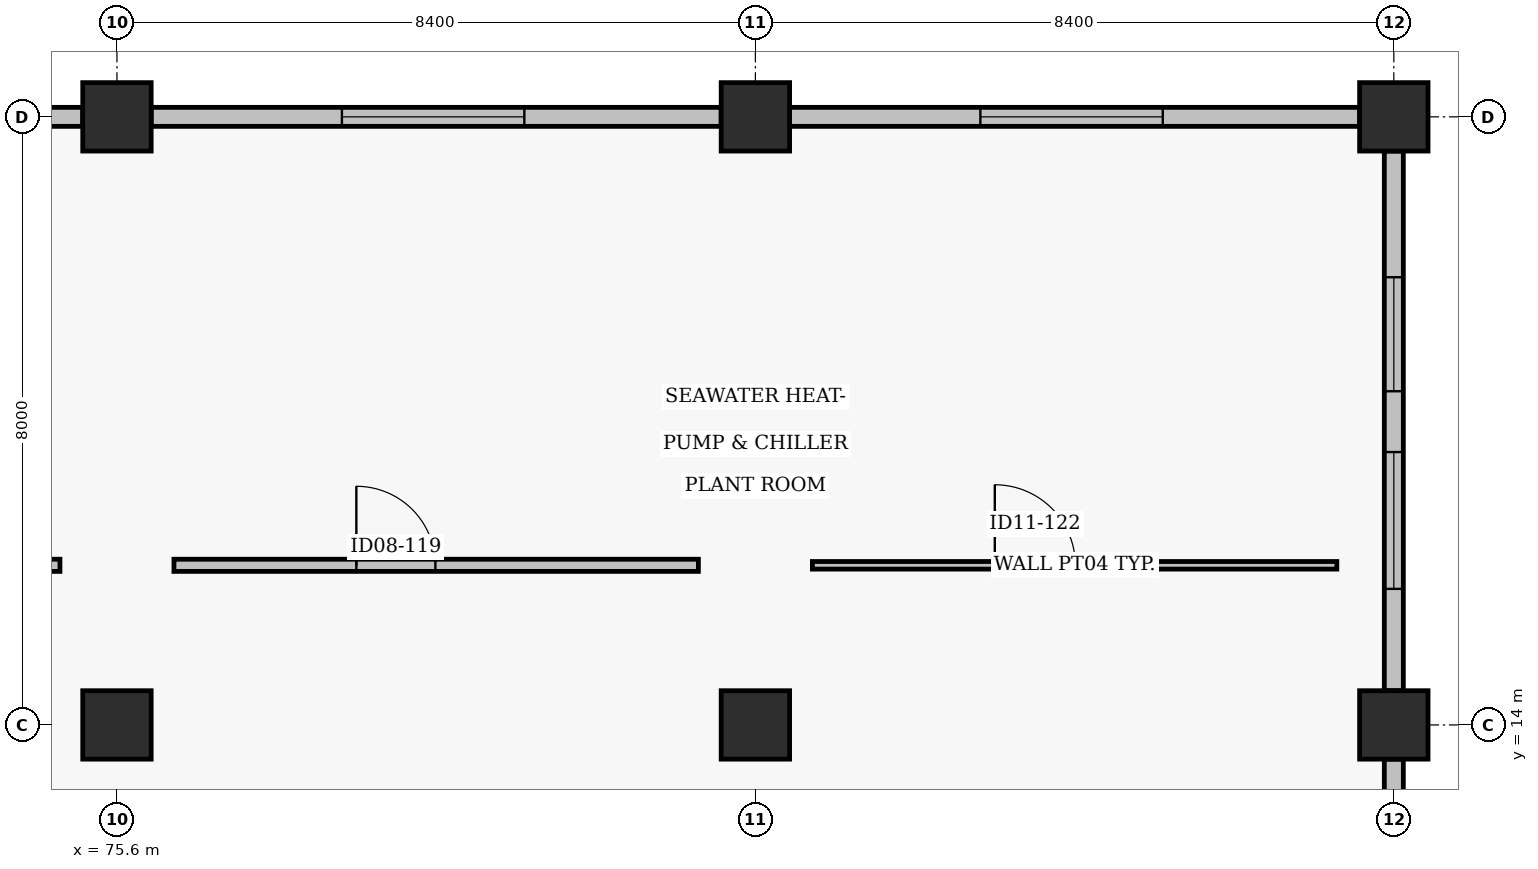
"""IFC4 building model, lengths in metres.
Left out: names, types, materials, properties, quantities, classifications, styles, units other than length and angle.
Written with IfcOpenShell. Run it as: python <this file> out.ifc"""

import sys

from ifc_helpers import new_model, si_unit, direction, frame, frame_2d, origin, origin_2d, place, context, subcontext, project, spatial, rectangle, extrude, element, fill, save


model = new_model("IFC4")
c1 = context("Model", 3, precision=1e-05, world=origin(), true_north=direction((0.0, 1.0)))
c2 = subcontext(c1, "Body", "Model", "MODEL_VIEW")
j1 = project(units=[si_unit("LENGTHUNIT", "METRE"), si_unit("PLANEANGLEUNIT", "RADIAN")], contexts=[c1])
p1 = place(None, origin())
s1 = spatial("IfcSite", under=j1, at=p1, CompositionType="ELEMENT")
p2 = place(p1, origin())
s2 = spatial("IfcBuilding", under=s1, at=p2, CompositionType="ELEMENT")
p3 = place(p2, origin())
s3 = spatial("IfcBuildingStorey", under=s2, at=p3, CompositionType="ELEMENT", Elevation=0.0)
for number, where, z_axis, x_axis in (
    (1, (75.6, 14.0, -0.46), (0.0, 0.0, 1.0), (1.0, 0.0, 0.0)),
    (2, (75.6, 22.0, -0.46), (0.0, 0.0, 1.0), (1.0, 0.0, 0.0)),
    (3, (84.0, 14.0, -0.46), (0.0, 0.0, 1.0), (1.0, 0.0, 0.0)),
    (4, (84.0, 22.0, -0.46), (0.0, 0.0, 1.0), (1.0, 0.0, 0.0)),
    (5, (92.4, 14.0, -0.46), (0.0, 0.0, 1.0), (1.0, 0.0, 0.0)),
    (6, (92.4, 22.0, -0.46), (0.0, 0.0, 1.0), (1.0, 0.0, 0.0)),
):
    element("IfcColumn", number, at=place(p3, frame(where, z_axis=z_axis, x_axis=x_axis)), inside=s3, PredefinedType="COLUMN", context=c2, shape_type="SweptSolid", body=[
        extrude(rectangle(XDim=0.9, YDim=0.9, at=origin_2d()), origin(), (0.0, 0.0, 1.0), 5.9),
    ])
p4 = place(p3, frame((75.15, 22.0, 0.0), z_axis=(0.0, 0.0, 1.0), x_axis=(-1.0, 0.0, 0.0)))
e7 = element("IfcWall", 7, at=p4, inside=s3, PredefinedType="SOLIDWALL", context=c2, shape_type="SweptSolid", body=[
    extrude(rectangle(XDim=7.5, YDim=0.25, at=frame_2d((3.75, 0.0))), origin(), (0.0, 0.0, 1.0), 4.625),
])
p5 = place(p4, frame((2.59, 0.0, 1.0)))
e8 = element("IfcOpeningElement", 8, at=p5, cuts=e7, PredefinedType="OPENING", context=c2, shape_type="SweptSolid", body=[
    extrude(rectangle(XDim=2.4, YDim=1.5, at=frame_2d((1.2, 0.75))), frame((0.0, 0.135, 0.0), z_axis=(0.0, -1.0, 0.0), x_axis=(1.0, 0.0, 0.0)), (0.0, 0.0, 1.0), 0.27),
])
p6 = place(p3, frame((83.55, 22.0, 0.0), z_axis=(0.0, 0.0, 1.0), x_axis=(-1.0, 0.0, 0.0)))
e9 = element("IfcWall", 9, at=p6, inside=s3, PredefinedType="SOLIDWALL", context=c2, shape_type="SweptSolid", body=[
    extrude(rectangle(XDim=7.5, YDim=0.25, at=frame_2d((3.75, 0.0))), origin(), (0.0, 0.0, 1.0), 4.625),
])
p7 = place(p6, frame((2.59, 0.0, 1.0)))
e10 = element("IfcOpeningElement", 10, at=p7, cuts=e9, PredefinedType="OPENING", context=c2, shape_type="SweptSolid", body=[
    extrude(rectangle(XDim=2.4, YDim=1.5, at=frame_2d((1.2, 0.75))), frame((0.0, 0.135, 0.0), z_axis=(0.0, -1.0, 0.0), x_axis=(1.0, 0.0, 0.0)), (0.0, 0.0, 1.0), 0.27),
])
p8 = place(p3, frame((91.95, 22.0, 0.0), z_axis=(0.0, 0.0, 1.0), x_axis=(-1.0, 0.0, 0.0)))
e11 = element("IfcWall", 11, at=p8, inside=s3, PredefinedType="SOLIDWALL", context=c2, shape_type="SweptSolid", body=[
    extrude(rectangle(XDim=7.5, YDim=0.25, at=frame_2d((3.75, 0.0))), origin(), (0.0, 0.0, 1.0), 4.625),
])
p9 = place(p8, frame((2.59, 0.0, 1.0)))
e12 = element("IfcOpeningElement", 12, at=p9, cuts=e11, PredefinedType="OPENING", context=c2, shape_type="SweptSolid", body=[
    extrude(rectangle(XDim=2.4, YDim=1.5, at=frame_2d((1.2, 0.75))), frame((0.0, 0.135, 0.0), z_axis=(0.0, -1.0, 0.0), x_axis=(1.0, 0.0, 0.0)), (0.0, 0.0, 1.0), 0.27),
])
p10 = place(p3, frame((92.4, 7.45, 0.0), z_axis=(0.0, 0.0, 1.0), x_axis=(0.0, 1.0, 0.0)))
e13 = element("IfcWall", 13, at=p10, inside=s3, PredefinedType="SOLIDWALL", context=c2, shape_type="SweptSolid", body=[
    extrude(rectangle(XDim=6.1, YDim=0.25, at=frame_2d((3.05, 0.0))), origin(), (0.0, 0.0, 1.0), 4.625),
])
p11 = place(p10, frame((1.34, 0.0, 0.95)))
e14 = element("IfcOpeningElement", 14, at=p11, cuts=e13, PredefinedType="OPENING", context=c2, shape_type="SweptSolid", body=[
    extrude(rectangle(XDim=1.8, YDim=1.5, at=frame_2d((0.9, 0.75))), frame((0.0, 0.135, 0.0), z_axis=(0.0, -1.0, 0.0), x_axis=(1.0, 0.0, 0.0)), (0.0, 0.0, 1.0), 0.27),
])
p12 = place(p10, frame((3.94, 0.0, 0.95)))
e15 = element("IfcOpeningElement", 15, at=p12, cuts=e13, PredefinedType="OPENING", context=c2, shape_type="SweptSolid", body=[
    extrude(rectangle(XDim=1.5, YDim=1.5, at=frame_2d((0.75, 0.75))), frame((0.0, 0.135, 0.0), z_axis=(0.0, -1.0, 0.0), x_axis=(1.0, 0.0, 0.0)), (0.0, 0.0, 1.0), 0.27),
])
p13 = place(p3, frame((92.4, 14.45, 0.0), z_axis=(0.0, 0.0, 1.0), x_axis=(0.0, 1.0, 0.0)))
e16 = element("IfcWall", 16, at=p13, inside=s3, PredefinedType="SOLIDWALL", context=c2, shape_type="SweptSolid", body=[
    extrude(rectangle(XDim=7.1, YDim=0.25, at=frame_2d((3.55, 0.0))), origin(), (0.0, 0.0, 1.0), 4.625),
])
p14 = place(p13, frame((1.34, 0.0, 0.95)))
e17 = element("IfcOpeningElement", 17, at=p14, cuts=e16, PredefinedType="OPENING", context=c2, shape_type="SweptSolid", body=[
    extrude(rectangle(XDim=1.8, YDim=1.5, at=frame_2d((0.9, 0.75))), frame((0.0, 0.135, 0.0), z_axis=(0.0, -1.0, 0.0), x_axis=(1.0, 0.0, 0.0)), (0.0, 0.0, 1.0), 0.27),
])
p15 = place(p13, frame((3.94, 0.0, 0.95)))
e18 = element("IfcOpeningElement", 18, at=p15, cuts=e16, PredefinedType="OPENING", context=c2, shape_type="SweptSolid", body=[
    extrude(rectangle(XDim=1.5, YDim=1.5, at=frame_2d((0.75, 0.75))), frame((0.0, 0.135, 0.0), z_axis=(0.0, -1.0, 0.0), x_axis=(1.0, 0.0, 0.0)), (0.0, 0.0, 1.0), 0.27),
])
p16 = place(p3, frame((67.95, 16.1, 0.0), z_axis=(0.0, 0.0, 1.0), x_axis=(1.0, 0.0, 0.0)))
e19 = element("IfcWall", 19, at=p16, inside=s3, PredefinedType="PARTITIONING", context=c2, shape_type="SweptSolid", body=[
    extrude(rectangle(XDim=6.9, YDim=0.16, at=frame_2d((3.45, 0.0))), origin(), (0.0, 0.0, 1.0), 2.5),
])
p17 = place(p16, frame((2.4, 0.0, 0.0)))
e20 = element("IfcOpeningElement", 20, at=p17, cuts=e19, PredefinedType="OPENING", context=c2, shape_type="SweptSolid", body=[
    extrude(rectangle(XDim=1.04, YDim=2.14, at=frame_2d((0.52, 1.07))), frame((0.0, 0.09, 0.0), z_axis=(0.0, -1.0, 0.0), x_axis=(1.0, 0.0, 0.0)), (0.0, 0.0, 1.0), 0.18),
])
p18 = place(p3, frame((76.35, 16.1, 0.0), z_axis=(0.0, 0.0, 1.0), x_axis=(1.0, 0.0, 0.0)))
e21 = element("IfcWall", 21, at=p18, inside=s3, PredefinedType="PARTITIONING", context=c2, shape_type="SweptSolid", body=[
    extrude(rectangle(XDim=6.9, YDim=0.16, at=frame_2d((3.45, 0.0))), origin(), (0.0, 0.0, 1.0), 2.5),
])
p19 = place(p18, frame((2.4, 0.0, 0.0)))
e22 = element("IfcOpeningElement", 22, at=p19, cuts=e21, PredefinedType="OPENING", context=c2, shape_type="SweptSolid", body=[
    extrude(rectangle(XDim=1.04, YDim=2.14, at=frame_2d((0.52, 1.07))), frame((0.0, 0.09, 0.0), z_axis=(0.0, -1.0, 0.0), x_axis=(1.0, 0.0, 0.0)), (0.0, 0.0, 1.0), 0.18),
])
p20 = place(p3, frame((84.75, 16.1, 0.0), z_axis=(0.0, 0.0, 1.0), x_axis=(1.0, 0.0, 0.0)))
e23 = element("IfcWall", 23, at=p20, inside=s3, PredefinedType="PARTITIONING", context=c2, shape_type="SweptSolid", body=[
    extrude(rectangle(XDim=6.9, YDim=0.1, at=frame_2d((3.45, 0.0))), origin(), (0.0, 0.0, 1.0), 2.5),
])
p21 = place(p20, frame((2.4, 0.0, 0.0)))
e24 = element("IfcOpeningElement", 24, at=p21, cuts=e23, PredefinedType="OPENING", context=c2, shape_type="SweptSolid", body=[
    extrude(rectangle(XDim=1.06, YDim=2.1, at=frame_2d((0.53, 1.05))), frame((0.0, 0.06, 0.0), z_axis=(0.0, -1.0, 0.0), x_axis=(1.0, 0.0, 0.0)), (0.0, 0.0, 1.0), 0.12),
])
p22 = place(p7, origin())
e25 = element("IfcWindow", 25, at=p22, inside=s3, PartitioningType="TRIPLE_PANEL_VERTICAL", PredefinedType="WINDOW", context=c2, shape_type="SweptSolid", body=[
    extrude(rectangle(XDim=2.4, YDim=1.5, at=frame_2d((1.2, 0.75))), frame((0.0, 0.03, 0.0), z_axis=(0.0, -1.0, 0.0), x_axis=(1.0, 0.0, 0.0)), (0.0, 0.0, 1.0), 0.06),
])
fill(e10, e25)
p23 = place(p9, origin())
e26 = element("IfcWindow", 26, at=p23, inside=s3, PartitioningType="TRIPLE_PANEL_VERTICAL", PredefinedType="WINDOW", context=c2, shape_type="SweptSolid", body=[
    extrude(rectangle(XDim=2.4, YDim=1.5, at=frame_2d((1.2, 0.75))), frame((0.0, 0.03, 0.0), z_axis=(0.0, -1.0, 0.0), x_axis=(1.0, 0.0, 0.0)), (0.0, 0.0, 1.0), 0.06),
])
fill(e12, e26)
p24 = place(p14, origin())
e27 = element("IfcWindow", 27, at=p24, inside=s3, PartitioningType="DOUBLE_PANEL_VERTICAL", PredefinedType="WINDOW", context=c2, shape_type="SweptSolid", body=[
    extrude(rectangle(XDim=1.8, YDim=1.5, at=frame_2d((0.9, 0.75))), frame((0.0, 0.03, 0.0), z_axis=(0.0, -1.0, 0.0), x_axis=(1.0, 0.0, 0.0)), (0.0, 0.0, 1.0), 0.06),
])
fill(e17, e27)
p25 = place(p15, origin())
e28 = element("IfcWindow", 28, at=p25, inside=s3, PartitioningType="SINGLE_PANEL", PredefinedType="WINDOW", context=c2, shape_type="SweptSolid", body=[
    extrude(rectangle(XDim=1.5, YDim=1.5, at=frame_2d((0.75, 0.75))), frame((0.0, 0.03, 0.0), z_axis=(0.0, -1.0, 0.0), x_axis=(1.0, 0.0, 0.0)), (0.0, 0.0, 1.0), 0.06),
])
fill(e18, e28)
p26 = place(p19, origin())
e29 = element("IfcDoor", 29, at=p26, inside=s3, OperationType="SINGLE_SWING_LEFT", PredefinedType="DOOR", context=c2, shape_type="SweptSolid", body=[
    extrude(rectangle(XDim=1.04, YDim=2.14, at=frame_2d((0.52, 1.07))), frame((0.0, 0.025, 0.0), z_axis=(0.0, -1.0, 0.0), x_axis=(1.0, 0.0, 0.0)), (0.0, 0.0, 1.0), 0.05),
])
fill(e22, e29)
p27 = place(p21, origin())
e30 = element("IfcDoor", 30, at=p27, inside=s3, OperationType="SINGLE_SWING_LEFT", PredefinedType="DOOR", context=c2, shape_type="SweptSolid", body=[
    extrude(rectangle(XDim=1.06, YDim=2.1, at=frame_2d((0.53, 1.05))), frame((0.0, 0.025, 0.0), z_axis=(0.0, -1.0, 0.0), x_axis=(1.0, 0.0, 0.0)), (0.0, 0.0, 1.0), 0.05),
])
fill(e24, e30)
save(model, sys.argv[1])
